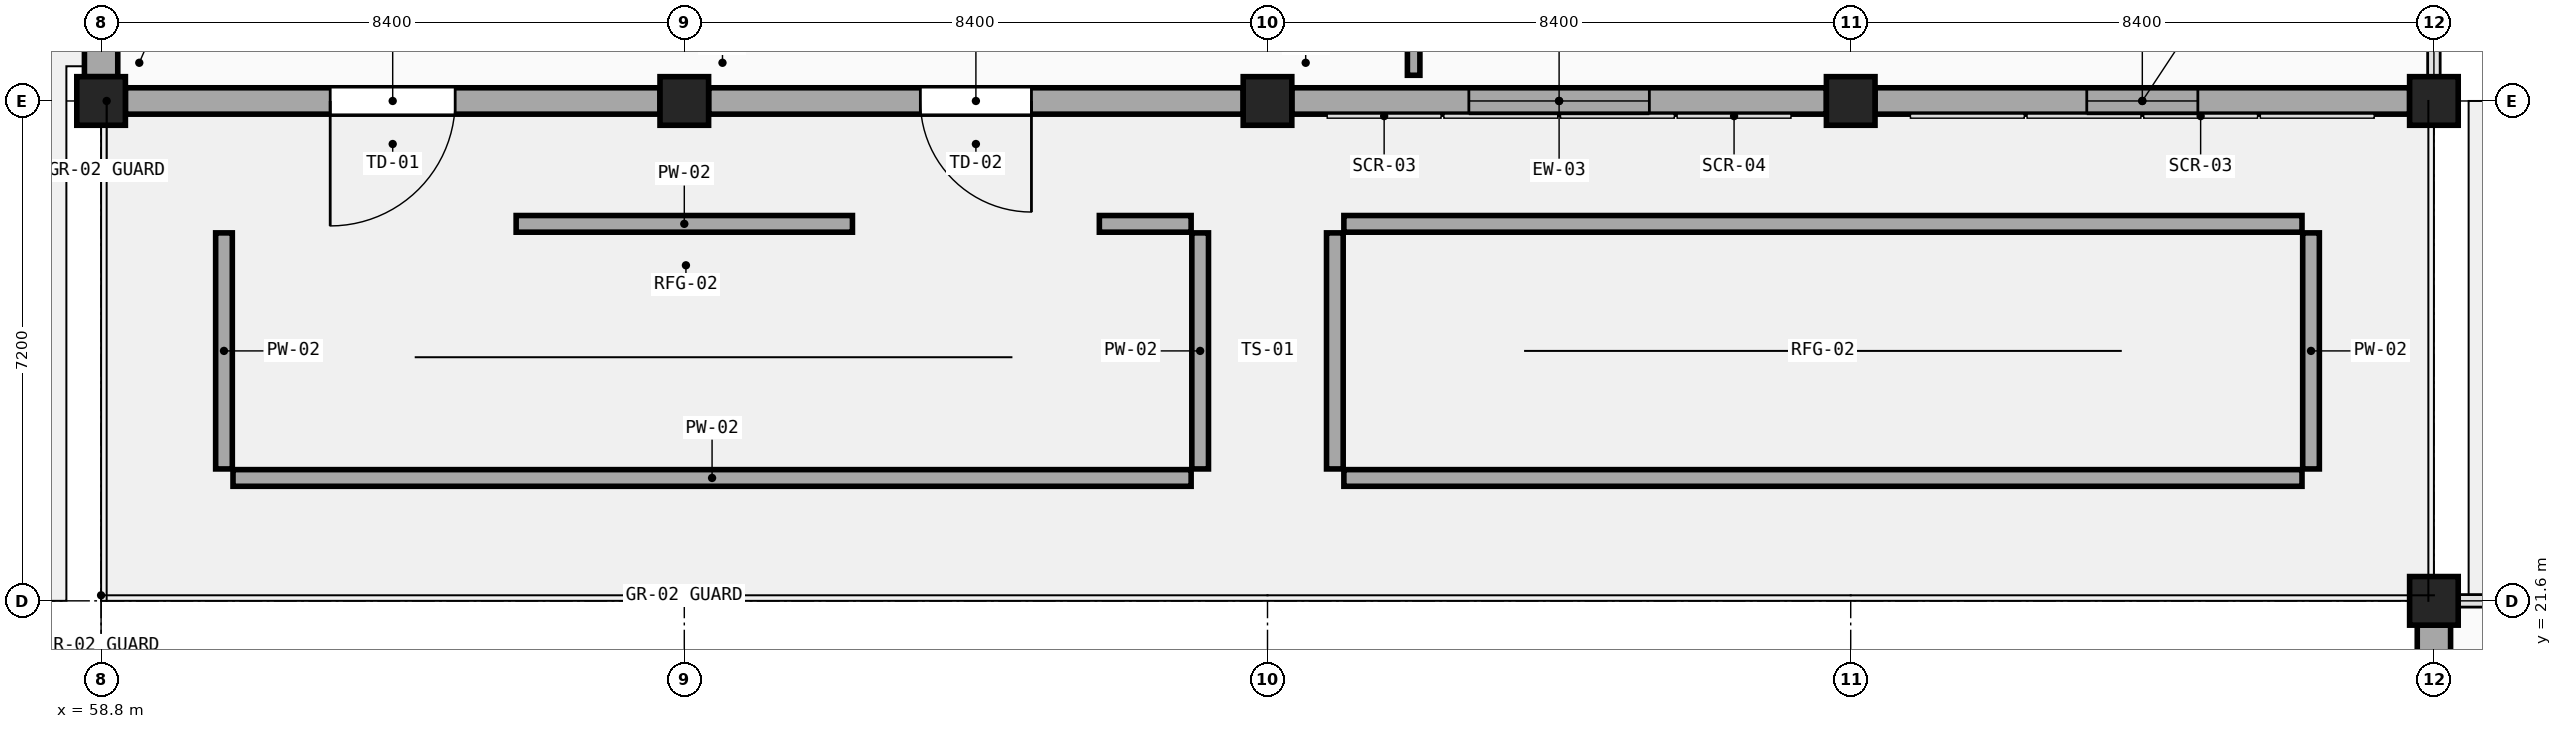
"""IFC4 building model, lengths in metres.
Left out: names, types, materials, properties, quantities, classifications, styles, units other than length and angle.
Written with IfcOpenShell. Run it as: python <this file> out.ifc"""

import sys

from ifc_helpers import new_model, si_unit, direction, frame, frame_2d, origin, origin_2d, place, context, subcontext, project, spatial, rectangle, extrude, element, fill, save


model = new_model("IFC4")
c1 = context("Model", 3, precision=1e-05, world=origin(), true_north=direction((0.0, 1.0)))
c2 = subcontext(c1, "Body", "Model", "MODEL_VIEW")
j1 = project(units=[si_unit("LENGTHUNIT", "METRE"), si_unit("PLANEANGLEUNIT", "RADIAN")], contexts=[c1])
p1 = place(None, origin())
s1 = spatial("IfcSite", under=j1, at=p1, CompositionType="ELEMENT")
p2 = place(p1, origin())
s2 = spatial("IfcBuilding", under=s1, at=p2, CompositionType="ELEMENT")
p3 = place(p2, frame((0.0, 0.0, 14.4)))
s3 = spatial("IfcBuildingStorey", under=s2, at=p3, CompositionType="ELEMENT", Elevation=14.4)
for number, where, z_axis, x_axis in (
    (1, (58.8, 28.8, 0.0), (0.0, 0.0, 1.0), (1.0, 0.0, 0.0)),
    (2, (67.2, 28.8, 0.0), (0.0, 0.0, 1.0), (1.0, 0.0, 0.0)),
    (3, (75.6, 28.8, 0.0), (0.0, 0.0, 1.0), (1.0, 0.0, 0.0)),
    (4, (84.0, 28.8, 0.0), (0.0, 0.0, 1.0), (1.0, 0.0, 0.0)),
    (5, (92.4, 21.6, 0.0), (0.0, 0.0, 1.0), (1.0, 0.0, 0.0)),
    (6, (92.4, 28.8, 0.0), (0.0, 0.0, 1.0), (1.0, 0.0, 0.0)),
):
    element("IfcColumn", number, at=place(p3, frame(where, z_axis=z_axis, x_axis=x_axis)), inside=s3, PredefinedType="COLUMN", context=c2, shape_type="SweptSolid", body=[
        extrude(rectangle(XDim=0.7, YDim=0.7, at=origin_2d()), origin(), (0.0, 0.0, 1.0), 4.5),
    ])
p4 = place(p3, frame((66.85, 28.8, 0.0), z_axis=(0.0, 0.0, 1.0), x_axis=(-1.0, 0.0, 0.0)))
e7 = element("IfcWall", 7, at=p4, inside=s3, PredefinedType="SOLIDWALL", context=c2, shape_type="SweptSolid", body=[
    extrude(rectangle(XDim=7.7, YDim=0.38, at=frame_2d((3.85, 0.0))), origin(), (0.0, 0.0, 1.0), 3.63),
])
p5 = place(p4, frame((2.95, 0.0, 0.0)))
e8 = element("IfcOpeningElement", 8, at=p5, cuts=e7, PredefinedType="OPENING", context=c2, shape_type="SweptSolid", body=[
    extrude(rectangle(XDim=1.8, YDim=2.25, at=frame_2d((0.9, 1.125))), frame((0.0, 0.21, 0.0), z_axis=(0.0, -1.0, 0.0), x_axis=(1.0, 0.0, 0.0)), (0.0, 0.0, 1.0), 0.42),
])
p6 = place(p3, frame((58.8, 29.15, 0.0), z_axis=(0.0, 0.0, 1.0), x_axis=(0.0, 1.0, 0.0)))
e9 = element("IfcWall", 9, at=p6, inside=s3, PredefinedType="SOLIDWALL", context=c2, shape_type="SweptSolid", body=[
    extrude(rectangle(XDim=6.475, YDim=0.48, at=frame_2d((3.238, 0.0))), origin(), (0.0, 0.0, 1.0), 3.63),
])
p7 = place(p6, frame((0.913, 0.0, 0.75)))
e10 = element("IfcOpeningElement", 10, at=p7, cuts=e9, PredefinedType="OPENING", context=c2, shape_type="SweptSolid", body=[
    extrude(rectangle(XDim=1.8, YDim=2.73, at=frame_2d((0.9, 1.365))), frame((0.0, 0.26, 0.0), z_axis=(0.0, -1.0, 0.0), x_axis=(1.0, 0.0, 0.0)), (0.0, 0.0, 1.0), 0.52),
])
p8 = place(p6, frame((3.662, 0.0, 0.75)))
e11 = element("IfcOpeningElement", 11, at=p8, cuts=e9, PredefinedType="OPENING", context=c2, shape_type="SweptSolid", body=[
    extrude(rectangle(XDim=2.0, YDim=2.73, at=frame_2d((1.0, 1.365))), frame((0.0, 0.26, 0.0), z_axis=(0.0, -1.0, 0.0), x_axis=(1.0, 0.0, 0.0)), (0.0, 0.0, 1.0), 0.52),
])
p9 = place(p3, frame((75.25, 28.8, 0.0), z_axis=(0.0, 0.0, 1.0), x_axis=(-1.0, 0.0, 0.0)))
e12 = element("IfcWall", 12, at=p9, inside=s3, PredefinedType="SOLIDWALL", context=c2, shape_type="SweptSolid", body=[
    extrude(rectangle(XDim=7.7, YDim=0.38, at=frame_2d((3.85, 0.0))), origin(), (0.0, 0.0, 1.0), 3.63),
])
p10 = place(p9, frame((3.05, 0.0, 0.0)))
e13 = element("IfcOpeningElement", 13, at=p10, cuts=e12, PredefinedType="OPENING", context=c2, shape_type="SweptSolid", body=[
    extrude(rectangle(XDim=1.6, YDim=2.2, at=frame_2d((0.8, 1.1))), frame((0.0, 0.21, 0.0), z_axis=(0.0, -1.0, 0.0), x_axis=(1.0, 0.0, 0.0)), (0.0, 0.0, 1.0), 0.42),
])
p11 = place(p3, frame((83.65, 28.8, 0.0), z_axis=(0.0, 0.0, 1.0), x_axis=(-1.0, 0.0, 0.0)))
e14 = element("IfcWall", 14, at=p11, inside=s3, PredefinedType="SOLIDWALL", context=c2, shape_type="SweptSolid", body=[
    extrude(rectangle(XDim=7.7, YDim=0.38, at=frame_2d((3.85, 0.0))), origin(), (0.0, 0.0, 1.0), 3.63),
])
p12 = place(p11, frame((2.55, 0.0, 0.75)))
e15 = element("IfcOpeningElement", 15, at=p12, cuts=e14, PredefinedType="OPENING", context=c2, shape_type="SweptSolid", body=[
    extrude(rectangle(XDim=2.6, YDim=2.68, at=frame_2d((1.3, 1.34))), frame((0.0, 0.21, 0.0), z_axis=(0.0, -1.0, 0.0), x_axis=(1.0, 0.0, 0.0)), (0.0, 0.0, 1.0), 0.42),
])
p13 = place(p3, frame((92.05, 28.8, 0.0), z_axis=(0.0, 0.0, 1.0), x_axis=(-1.0, 0.0, 0.0)))
e16 = element("IfcWall", 16, at=p13, inside=s3, PredefinedType="SOLIDWALL", context=c2, shape_type="SweptSolid", body=[
    extrude(rectangle(XDim=7.7, YDim=0.38, at=frame_2d((3.85, 0.0))), origin(), (0.0, 0.0, 1.0), 3.63),
])
p14 = place(p13, frame((3.05, 0.0, 0.75)))
e17 = element("IfcOpeningElement", 17, at=p14, cuts=e16, PredefinedType="OPENING", context=c2, shape_type="SweptSolid", body=[
    extrude(rectangle(XDim=1.6, YDim=2.68, at=frame_2d((0.8, 1.34))), frame((0.0, 0.21, 0.0), z_axis=(0.0, -1.0, 0.0), x_axis=(1.0, 0.0, 0.0)), (0.0, 0.0, 1.0), 0.42),
])
p15 = place(p3, frame((92.4, 14.75, 0.0), z_axis=(0.0, 0.0, 1.0), x_axis=(0.0, 1.0, 0.0)))
e18 = element("IfcWall", 18, at=p15, inside=s3, PredefinedType="SOLIDWALL", context=c2, shape_type="SweptSolid", body=[
    extrude(rectangle(XDim=6.5, YDim=0.48, at=frame_2d((3.25, 0.0))), origin(), (0.0, 0.0, 1.0), 3.63),
])
p16 = place(p3, frame((64.778, 27.03, 0.0), z_axis=(0.0, 0.0, 1.0), x_axis=(1.0, 0.0, 0.0)))
e19 = element("IfcWall", 19, at=p16, inside=s3, PredefinedType="PARAPET", context=c2, shape_type="SweptSolid", body=[
    extrude(rectangle(XDim=4.844, YDim=0.24, at=frame_2d((2.422, 0.0))), origin(), (0.0, 0.0, 1.0), 0.5),
])
p17 = place(p3, frame((73.178, 27.03, 0.0), z_axis=(0.0, 0.0, 1.0), x_axis=(1.0, 0.0, 0.0)))
e20 = element("IfcWall", 20, at=p17, inside=s3, PredefinedType="PARAPET", context=c2, shape_type="SweptSolid", body=[
    extrude(rectangle(XDim=1.322, YDim=0.24, at=frame_2d((0.661, 0.0))), origin(), (0.0, 0.0, 1.0), 0.5),
])
p18 = place(p3, frame((74.63, 26.9, 0.0), z_axis=(0.0, 0.0, 1.0), x_axis=(0.0, -1.0, 0.0)))
e21 = element("IfcWall", 21, at=p18, inside=s3, PredefinedType="PARAPET", context=c2, shape_type="SweptSolid", body=[
    extrude(rectangle(XDim=3.4, YDim=0.24, at=frame_2d((1.7, 0.0))), origin(), (0.0, 0.0, 1.0), 0.5),
])
p19 = place(p3, frame((74.5, 23.37, 0.0), z_axis=(0.0, 0.0, 1.0), x_axis=(-1.0, 0.0, 0.0)))
e22 = element("IfcWall", 22, at=p19, inside=s3, PredefinedType="PARAPET", context=c2, shape_type="SweptSolid", body=[
    extrude(rectangle(XDim=13.8, YDim=0.24, at=frame_2d((6.9, 0.0))), origin(), (0.0, 0.0, 1.0), 0.5),
])
for number, where, z_axis, x_axis in (
    (23, (60.57, 23.5, 0.0), (0.0, 0.0, 1.0), (0.0, 1.0, 0.0)),
    (24, (90.63, 26.9, 0.0), (0.0, 0.0, 1.0), (0.0, -1.0, 0.0)),
):
    element("IfcWall", number, at=place(p3, frame(where, z_axis=z_axis, x_axis=x_axis)), inside=s3, PredefinedType="PARAPET", context=c2, shape_type="SweptSolid", body=[
        extrude(rectangle(XDim=3.4, YDim=0.24, at=frame_2d((1.7, 0.0))), origin(), (0.0, 0.0, 1.0), 0.5),
    ])
p20 = place(p3, frame((90.5, 23.37, 0.0), z_axis=(0.0, 0.0, 1.0), x_axis=(-1.0, 0.0, 0.0)))
e25 = element("IfcWall", 25, at=p20, inside=s3, PredefinedType="PARAPET", context=c2, shape_type="SweptSolid", body=[
    extrude(rectangle(XDim=13.8, YDim=0.24, at=frame_2d((6.9, 0.0))), origin(), (0.0, 0.0, 1.0), 0.5),
])
p21 = place(p3, frame((76.57, 23.5, 0.0), z_axis=(0.0, 0.0, 1.0), x_axis=(0.0, 1.0, 0.0)))
e26 = element("IfcWall", 26, at=p21, inside=s3, PredefinedType="PARAPET", context=c2, shape_type="SweptSolid", body=[
    extrude(rectangle(XDim=3.4, YDim=0.24, at=frame_2d((1.7, 0.0))), origin(), (0.0, 0.0, 1.0), 0.5),
])
p22 = place(p3, frame((76.7, 27.03, 0.0), z_axis=(0.0, 0.0, 1.0), x_axis=(1.0, 0.0, 0.0)))
e27 = element("IfcWall", 27, at=p22, inside=s3, PredefinedType="PARAPET", context=c2, shape_type="SweptSolid", body=[
    extrude(rectangle(XDim=13.8, YDim=0.24, at=frame_2d((6.9, 0.0))), origin(), (0.0, 0.0, 1.0), 0.5),
])
p23 = place(p3, frame((77.705, 29.17, 0.0), z_axis=(0.0, 0.0, 1.0), x_axis=(0.0, 1.0, 0.0)))
e28 = element("IfcWall", 28, at=p23, inside=s3, PredefinedType="PARTITIONING", context=c2, shape_type="SweptSolid", body=[
    extrude(rectangle(XDim=10.687, YDim=0.18, at=frame_2d((5.344, 0.0))), origin(), (0.0, 0.0, 1.0), 4.18),
])
p24 = place(p5, origin())
e29 = element("IfcDoor", 29, at=p24, inside=s3, OperationType="SINGLE_SWING_RIGHT", PredefinedType="DOOR", context=c2, shape_type="SweptSolid", body=[
    extrude(rectangle(XDim=1.8, YDim=2.25, at=frame_2d((0.9, 1.125))), frame((0.0, 0.025, 0.0), z_axis=(0.0, -1.0, 0.0), x_axis=(1.0, 0.0, 0.0)), (0.0, 0.0, 1.0), 0.05),
])
fill(e8, e29)
p25 = place(p10, origin())
e30 = element("IfcDoor", 30, at=p25, inside=s3, OperationType="SINGLE_SWING_LEFT", PredefinedType="DOOR", context=c2, shape_type="SweptSolid", body=[
    extrude(rectangle(XDim=1.6, YDim=2.2, at=frame_2d((0.8, 1.1))), frame((0.0, 0.025, 0.0), z_axis=(0.0, -1.0, 0.0), x_axis=(1.0, 0.0, 0.0)), (0.0, 0.0, 1.0), 0.05),
])
fill(e13, e30)
p26 = place(p12, origin())
e31 = element("IfcWindow", 31, at=p26, inside=s3, PartitioningType="TRIPLE_PANEL_VERTICAL", PredefinedType="WINDOW", context=c2, shape_type="SweptSolid", body=[
    extrude(rectangle(XDim=2.6, YDim=2.68, at=frame_2d((1.3, 1.34))), frame((0.0, 0.03, 0.0), z_axis=(0.0, -1.0, 0.0), x_axis=(1.0, 0.0, 0.0)), (0.0, 0.0, 1.0), 0.06),
])
fill(e15, e31)
p27 = place(p14, origin())
e32 = element("IfcWindow", 32, at=p27, inside=s3, PartitioningType="DOUBLE_PANEL_VERTICAL", PredefinedType="WINDOW", context=c2, shape_type="SweptSolid", body=[
    extrude(rectangle(XDim=1.6, YDim=2.68, at=frame_2d((0.8, 1.34))), frame((0.0, 0.03, 0.0), z_axis=(0.0, -1.0, 0.0), x_axis=(1.0, 0.0, 0.0)), (0.0, 0.0, 1.0), 0.06),
])
fill(e17, e32)
save(model, sys.argv[1])
